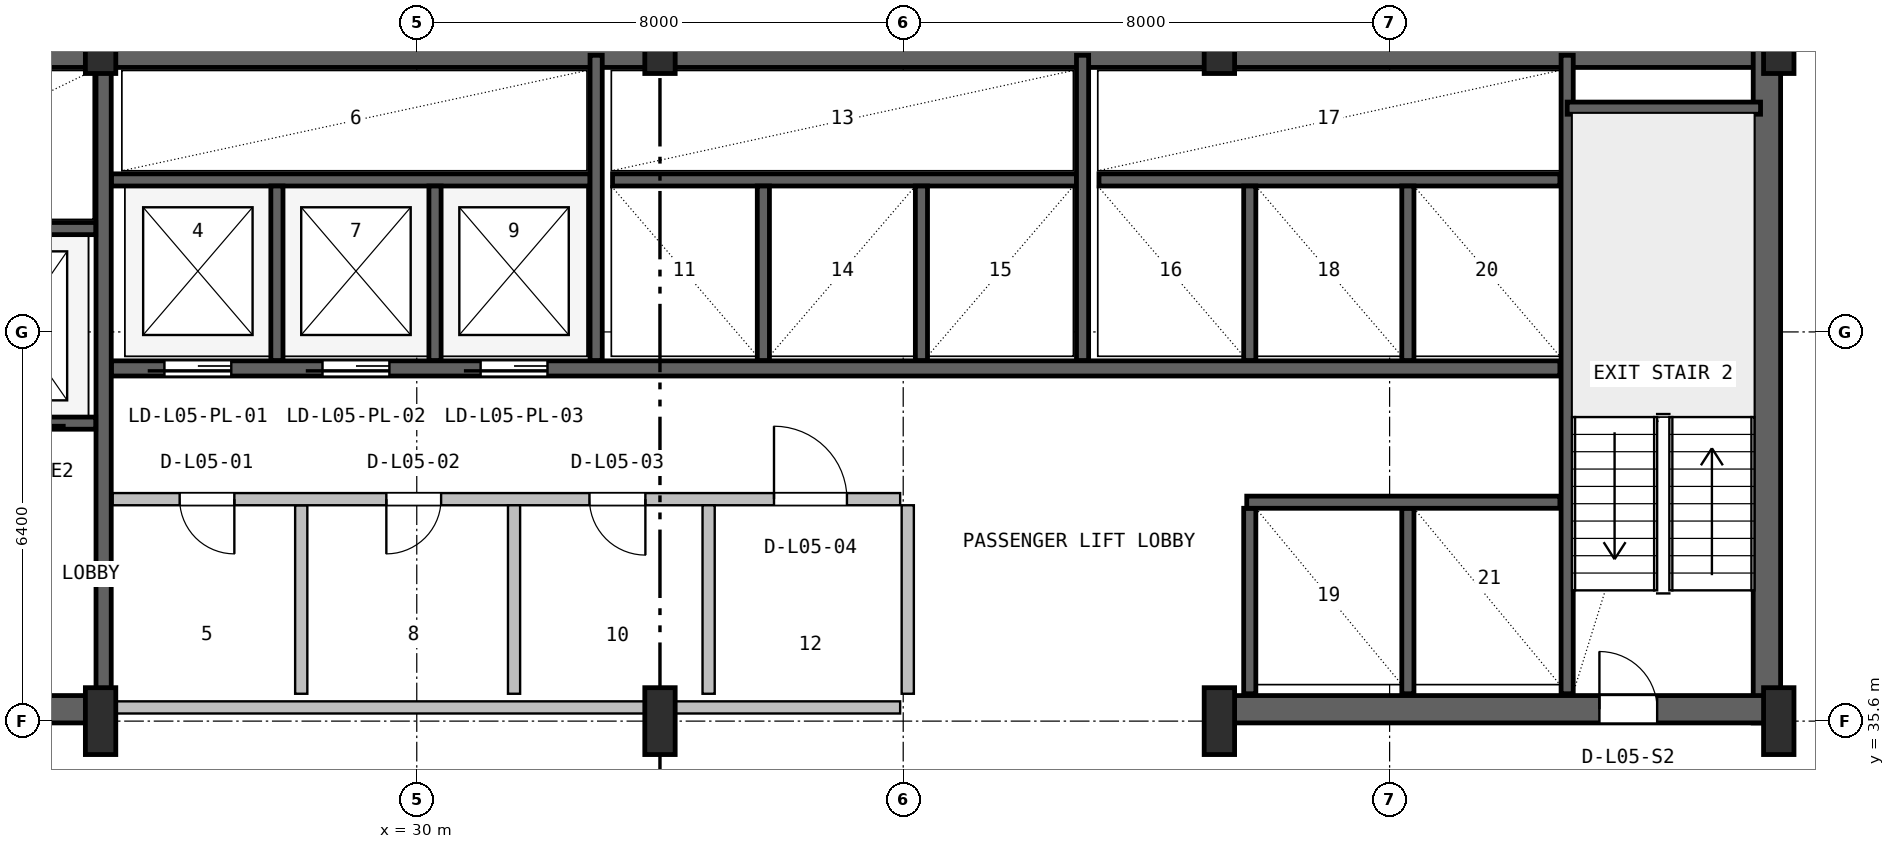
"""IFC4 building model, lengths in metres.
Left out: names, types, materials, properties, quantities, classifications, styles, units other than length and angle.
Written with IfcOpenShell. Run it as: python <this file> out.ifc"""

import sys

from ifc_helpers import new_model, si_unit, direction, frame, frame_2d, origin, origin_2d, place, context, subcontext, project, spatial, rectangle, i_section, extrude, source, transform, mapped, element, fill, save


model = new_model("IFC4")
c1 = context("Model", 3, precision=1e-05, world=origin(), true_north=direction((0.0, 1.0)))
c2 = subcontext(c1, "Body", "Model", "MODEL_VIEW")
j1 = project(units=[si_unit("LENGTHUNIT", "METRE"), si_unit("PLANEANGLEUNIT", "RADIAN")], contexts=[c1])
p1 = place(None, origin())
s1 = spatial("IfcSite", under=j1, at=p1, CompositionType="ELEMENT")
p2 = place(p1, origin())
s2 = spatial("IfcBuilding", under=s1, at=p2, CompositionType="ELEMENT")
p3 = place(p2, frame((0.0, 0.0, 27.6)))
s3 = spatial("IfcBuildingStorey", under=s2, at=p3, CompositionType="ELEMENT", Elevation=27.6)
p4 = place(p3, frame((15.6, 46.575, 0.0), z_axis=(0.0, 0.0, 1.0), x_axis=(1.0, 0.0, 0.0)))
e1 = element("IfcWall", 1, at=p4, inside=s3, PredefinedType="SHEAR", context=c2, shape_type="SweptSolid", body=[
    extrude(rectangle(XDim=36.8, YDim=0.45, at=frame_2d((18.4, 0.0))), origin(), (0.0, 0.0, 1.0), 3.65),
])
p5 = place(p3, frame((52.205, 35.57, 0.0), z_axis=(0.0, 0.0, 1.0), x_axis=(0.0, 1.0, 0.0)))
e2 = element("IfcWall", 2, at=p5, inside=s3, PredefinedType="SHEAR", context=c2, shape_type="SweptSolid", body=[
    extrude(rectangle(XDim=11.23, YDim=0.45, at=frame_2d((5.615, 0.0))), origin(), (0.0, 0.0, 1.0), 3.65),
])
p6 = place(p3, frame((15.57, 35.795, 0.0), z_axis=(0.0, 0.0, 1.0), x_axis=(1.0, 0.0, 0.0)))
e3 = element("IfcWall", 3, at=p6, inside=s3, PredefinedType="SHEAR", context=c2, shape_type="SweptSolid", body=[
    extrude(rectangle(XDim=9.23, YDim=0.45, at=frame_2d((4.615, 0.0))), origin(), (0.0, 0.0, 1.0), 3.65),
])
p7 = place(p6, frame((5.4, 0.0, 0.0)))
e4 = element("IfcOpeningElement", 4, at=p7, cuts=e3, PredefinedType="OPENING", context=c2, shape_type="SweptSolid", body=[
    extrude(rectangle(XDim=1.0, YDim=2.1, at=frame_2d((0.5, 1.05))), frame((0.0, 0.235, 0.0), z_axis=(0.0, -1.0, 0.0), x_axis=(1.0, 0.0, 0.0)), (0.0, 0.0, 1.0), 0.47),
])
p8 = place(p3, frame((43.2, 35.795, 0.0), z_axis=(0.0, 0.0, 1.0), x_axis=(1.0, 0.0, 0.0)))
e5 = element("IfcWall", 5, at=p8, inside=s3, PredefinedType="SHEAR", context=c2, shape_type="SweptSolid", body=[
    extrude(rectangle(XDim=9.23, YDim=0.45, at=frame_2d((4.615, 0.0))), origin(), (0.0, 0.0, 1.0), 3.65),
])
p9 = place(p8, frame((6.25, 0.0, 0.0)))
e6 = element("IfcOpeningElement", 6, at=p9, cuts=e5, PredefinedType="OPENING", context=c2, shape_type="SweptSolid", body=[
    extrude(rectangle(XDim=0.95, YDim=2.1, at=frame_2d((0.475, 1.05))), frame((0.0, 0.235, 0.0), z_axis=(0.0, -1.0, 0.0), x_axis=(1.0, 0.0, 0.0)), (0.0, 0.0, 1.0), 0.47),
])
m1 = source(origin(), c2, "Body", "SweptSolid", [
    extrude(i_section(OverallWidth=0.5, OverallDepth=1.1, WebThickness=0.018, FlangeThickness=0.032, FilletRadius=0.018, at=origin_2d()), origin(), (0.0, 0.0, 1.0), 3.9),
])
for number, where, z_axis, x_axis in (
    (7, (24.8, 35.6, 0.0), (0.0, 0.0, 1.0), (1.0, 0.0, 0.0)),
    (8, (24.8, 46.8, 0.0), (0.0, 0.0, 1.0), (1.0, 0.0, 0.0)),
    (9, (34.0, 35.6, 0.0), (0.0, 0.0, 1.0), (1.0, 0.0, 0.0)),
    (10, (34.0, 46.8, 0.0), (0.0, 0.0, 1.0), (1.0, 0.0, 0.0)),
    (11, (43.2, 35.6, 0.0), (0.0, 0.0, 1.0), (1.0, 0.0, 0.0)),
    (12, (43.2, 46.8, 0.0), (0.0, 0.0, 1.0), (1.0, 0.0, 0.0)),
    (13, (52.4, 35.6, 0.0), (0.0, 0.0, 1.0), (1.0, 0.0, 0.0)),
    (14, (52.4, 46.8, 0.0), (0.0, 0.0, 1.0), (1.0, 0.0, 0.0)),
):
    element("IfcColumn", number, at=place(p3, frame(where, z_axis=z_axis, x_axis=x_axis)), inside=s3, PredefinedType="COLUMN", context=c2, shape_type="MappedRepresentation", body=[
        mapped(m1, transform((0.0, 0.0, 0.0), x_axis=(1.0, 0.0, 0.0), y_axis=(0.0, 1.0, 0.0), z_axis=(0.0, 0.0, 1.0), scale=1.0)),
    ])
p10 = place(p3, frame((24.85, 36.05, 0.0), z_axis=(0.0, 0.0, 1.0), x_axis=(0.0, 1.0, 0.0)))
e15 = element("IfcWall", 15, at=p10, inside=s3, PredefinedType="SHEAR", context=c2, shape_type="SweptSolid", body=[
    extrude(rectangle(XDim=10.45, YDim=0.25, at=frame_2d((5.225, 0.0))), origin(), (0.0, 0.0, 1.0), 3.65),
])
p11 = place(p3, frame((19.2, 40.5, 0.0), z_axis=(0.0, 0.0, 1.0), x_axis=(1.0, 0.0, 0.0)))
e16 = element("IfcWall", 16, at=p11, inside=s3, PredefinedType="SHEAR", context=c2, shape_type="SweptSolid", body=[
    extrude(rectangle(XDim=5.52, YDim=0.2, at=frame_2d((2.76, 0.0))), origin(), (0.0, 0.0, 1.0), 3.65),
])
p12 = place(p11, frame((1.05, 0.0, 0.0)))
e17 = element("IfcOpeningElement", 17, at=p12, cuts=e16, PredefinedType="OPENING", context=c2, shape_type="SweptSolid", body=[
    extrude(rectangle(XDim=1.1, YDim=2.18, at=frame_2d((0.55, 1.09))), frame((0.0, 0.11, 0.0), z_axis=(0.0, -1.0, 0.0), x_axis=(1.0, 0.0, 0.0)), (0.0, 0.0, 1.0), 0.22),
])
p13 = place(p11, frame((3.65, 0.0, 0.0)))
e18 = element("IfcOpeningElement", 18, at=p13, cuts=e16, PredefinedType="OPENING", context=c2, shape_type="SweptSolid", body=[
    extrude(rectangle(XDim=1.1, YDim=2.18, at=frame_2d((0.55, 1.09))), frame((0.0, 0.11, 0.0), z_axis=(0.0, -1.0, 0.0), x_axis=(1.0, 0.0, 0.0)), (0.0, 0.0, 1.0), 0.22),
])
p14 = place(p3, frame((19.2, 43.7, 0.0), z_axis=(0.0, 0.0, 1.0), x_axis=(1.0, 0.0, 0.0)))
e19 = element("IfcWall", 19, at=p14, inside=s3, PredefinedType="SHEAR", context=c2, shape_type="SweptSolid", body=[
    extrude(rectangle(XDim=5.52, YDim=0.2, at=frame_2d((2.76, 0.0))), origin(), (0.0, 0.0, 1.0), 3.65),
])
p15 = place(p3, frame((48.92, 36.05, 0.0), z_axis=(0.0, 0.0, 1.0), x_axis=(0.0, 1.0, 0.0)))
e20 = element("IfcWall", 20, at=p15, inside=s3, PredefinedType="SHEAR", context=c2, shape_type="SweptSolid", body=[
    extrude(rectangle(XDim=10.5, YDim=0.2, at=frame_2d((5.25, 0.0))), origin(), (0.0, 0.0, 1.0), 3.65),
])
p16 = place(p3, frame((48.92, 45.68, 0.0), z_axis=(0.0, 0.0, 1.0), x_axis=(1.0, 0.0, 0.0)))
e21 = element("IfcWall", 21, at=p16, inside=s3, PredefinedType="SHEAR", context=c2, shape_type="SweptSolid", body=[
    extrude(rectangle(XDim=3.18, YDim=0.2, at=frame_2d((1.59, 0.0))), origin(), (0.0, 0.0, 1.0), 3.65),
])
p17 = place(p3, frame((24.98, 41.4, 0.0), z_axis=(0.0, 0.0, 1.0), x_axis=(1.0, 0.0, 0.0)))
e22 = element("IfcWall", 22, at=p17, inside=s3, PredefinedType="SHEAR", context=c2, shape_type="SweptSolid", body=[
    extrude(rectangle(XDim=23.82, YDim=0.25, at=frame_2d((11.91, 0.0))), origin(), (0.0, 0.0, 1.0), 3.65),
])
p18 = place(p17, frame((0.87, 0.0, 0.0)))
e23 = element("IfcOpeningElement", 23, at=p18, cuts=e22, PredefinedType="OPENING", context=c2, shape_type="SweptSolid", body=[
    extrude(rectangle(XDim=1.1, YDim=2.18, at=frame_2d((0.55, 1.09))), frame((0.0, 0.135, 0.0), z_axis=(0.0, -1.0, 0.0), x_axis=(1.0, 0.0, 0.0)), (0.0, 0.0, 1.0), 0.27),
])
p19 = place(p17, frame((3.47, 0.0, 0.0)))
e24 = element("IfcOpeningElement", 24, at=p19, cuts=e22, PredefinedType="OPENING", context=c2, shape_type="SweptSolid", body=[
    extrude(rectangle(XDim=1.1, YDim=2.18, at=frame_2d((0.55, 1.09))), frame((0.0, 0.135, 0.0), z_axis=(0.0, -1.0, 0.0), x_axis=(1.0, 0.0, 0.0)), (0.0, 0.0, 1.0), 0.27),
])
p20 = place(p17, frame((6.07, 0.0, 0.0)))
e25 = element("IfcOpeningElement", 25, at=p20, cuts=e22, PredefinedType="OPENING", context=c2, shape_type="SweptSolid", body=[
    extrude(rectangle(XDim=1.1, YDim=2.18, at=frame_2d((0.55, 1.09))), frame((0.0, 0.135, 0.0), z_axis=(0.0, -1.0, 0.0), x_axis=(1.0, 0.0, 0.0)), (0.0, 0.0, 1.0), 0.27),
])
p21 = place(p3, frame((24.98, 44.5, 0.0), z_axis=(0.0, 0.0, 1.0), x_axis=(1.0, 0.0, 0.0)))
e26 = element("IfcWall", 26, at=p21, inside=s3, PredefinedType="SHEAR", context=c2, shape_type="SweptSolid", body=[
    extrude(rectangle(XDim=7.87, YDim=0.2, at=frame_2d((3.935, 0.0))), origin(), (0.0, 0.0, 1.0), 3.65),
])
for number, where, z_axis, x_axis in (
    (27, (27.7, 41.53, 0.0), (0.0, 0.0, 1.0), (0.0, 1.0, 0.0)),
    (28, (30.3, 41.53, 0.0), (0.0, 0.0, 1.0), (0.0, 1.0, 0.0)),
):
    element("IfcWall", number, at=place(p3, frame(where, z_axis=z_axis, x_axis=x_axis)), inside=s3, PredefinedType="SHEAR", context=c2, shape_type="SweptSolid", body=[
        extrude(rectangle(XDim=2.87, YDim=0.2, at=frame_2d((1.435, 0.0))), origin(), (0.0, 0.0, 1.0), 3.65),
    ])
p22 = place(p3, frame((32.95, 41.53, 0.0), z_axis=(0.0, 0.0, 1.0), x_axis=(0.0, 1.0, 0.0)))
e29 = element("IfcWall", 29, at=p22, inside=s3, PredefinedType="SHEAR", context=c2, shape_type="SweptSolid", body=[
    extrude(rectangle(XDim=5.02, YDim=0.2, at=frame_2d((2.51, 0.0))), origin(), (0.0, 0.0, 1.0), 3.65),
])
p23 = place(p3, frame((33.22, 44.5, 0.0), z_axis=(0.0, 0.0, 1.0), x_axis=(1.0, 0.0, 0.0)))
e30 = element("IfcWall", 30, at=p23, inside=s3, PredefinedType="SHEAR", context=c2, shape_type="SweptSolid", body=[
    extrude(rectangle(XDim=7.63, YDim=0.2, at=frame_2d((3.815, 0.0))), origin(), (0.0, 0.0, 1.0), 3.65),
])
for number, where, z_axis, x_axis in (
    (31, (35.7, 41.53, 0.0), (0.0, 0.0, 1.0), (0.0, 1.0, 0.0)),
    (32, (38.3, 41.53, 0.0), (0.0, 0.0, 1.0), (0.0, 1.0, 0.0)),
):
    element("IfcWall", number, at=place(p3, frame(where, z_axis=z_axis, x_axis=x_axis)), inside=s3, PredefinedType="SHEAR", context=c2, shape_type="SweptSolid", body=[
        extrude(rectangle(XDim=2.87, YDim=0.2, at=frame_2d((1.435, 0.0))), origin(), (0.0, 0.0, 1.0), 3.65),
    ])
p24 = place(p3, frame((40.95, 41.53, 0.0), z_axis=(0.0, 0.0, 1.0), x_axis=(0.0, 1.0, 0.0)))
e33 = element("IfcWall", 33, at=p24, inside=s3, PredefinedType="SHEAR", context=c2, shape_type="SweptSolid", body=[
    extrude(rectangle(XDim=5.02, YDim=0.2, at=frame_2d((2.51, 0.0))), origin(), (0.0, 0.0, 1.0), 3.65),
])
p25 = place(p3, frame((41.22, 44.5, 0.0), z_axis=(0.0, 0.0, 1.0), x_axis=(1.0, 0.0, 0.0)))
e34 = element("IfcWall", 34, at=p25, inside=s3, PredefinedType="SHEAR", context=c2, shape_type="SweptSolid", body=[
    extrude(rectangle(XDim=7.58, YDim=0.2, at=frame_2d((3.79, 0.0))), origin(), (0.0, 0.0, 1.0), 3.65),
])
for number, where, z_axis, x_axis in (
    (35, (43.7, 41.53, 0.0), (0.0, 0.0, 1.0), (0.0, 1.0, 0.0)),
    (36, (46.3, 41.53, 0.0), (0.0, 0.0, 1.0), (0.0, 1.0, 0.0)),
):
    element("IfcWall", number, at=place(p3, frame(where, z_axis=z_axis, x_axis=x_axis)), inside=s3, PredefinedType="SHEAR", context=c2, shape_type="SweptSolid", body=[
        extrude(rectangle(XDim=2.87, YDim=0.2, at=frame_2d((1.435, 0.0))), origin(), (0.0, 0.0, 1.0), 3.65),
    ])
for number, where, z_axis, x_axis in (
    (37, (43.7, 36.05, 0.0), (0.0, 0.0, 1.0), (0.0, 1.0, 0.0)),
    (38, (46.3, 36.05, 0.0), (0.0, 0.0, 1.0), (0.0, 1.0, 0.0)),
):
    element("IfcWall", number, at=place(p3, frame(where, z_axis=z_axis, x_axis=x_axis)), inside=s3, PredefinedType="SHEAR", context=c2, shape_type="SweptSolid", body=[
        extrude(rectangle(XDim=3.05, YDim=0.2, at=frame_2d((1.525, 0.0))), origin(), (0.0, 0.0, 1.0), 3.65),
    ])
p26 = place(p3, frame((43.65, 39.2, 0.0), z_axis=(0.0, 0.0, 1.0), x_axis=(1.0, 0.0, 0.0)))
e39 = element("IfcWall", 39, at=p26, inside=s3, PredefinedType="SHEAR", context=c2, shape_type="SweptSolid", body=[
    extrude(rectangle(XDim=5.15, YDim=0.2, at=frame_2d((2.575, 0.0))), origin(), (0.0, 0.0, 1.0), 3.65),
])
p27 = place(p3, frame((25.0, 35.825, 0.0), z_axis=(0.0, 0.0, 1.0), x_axis=(1.0, 0.0, 0.0)))
e40 = element("IfcWall", 40, at=p27, inside=s3, PredefinedType="SOLIDWALL", context=c2, shape_type="SweptSolid", body=[
    extrude(rectangle(XDim=12.95, YDim=0.2, at=frame_2d((6.475, 0.0))), origin(), (0.0, 0.0, 1.0), 2.425),
])
p28 = place(p3, frame((28.1, 36.05, 0.0), z_axis=(0.0, 0.0, 1.0), x_axis=(0.0, 1.0, 0.0)))
e41 = element("IfcWall", 41, at=p28, inside=s3, PredefinedType="PLUMBINGWALL", context=c2, shape_type="SweptSolid", body=[
    extrude(rectangle(XDim=3.1, YDim=0.2, at=frame_2d((1.55, 0.0))), origin(), (0.0, 0.0, 1.0), 3.63),
])
p29 = place(p3, frame((25.0, 39.25, 0.0), z_axis=(0.0, 0.0, 1.0), x_axis=(1.0, 0.0, 0.0)))
e42 = element("IfcWall", 42, at=p29, inside=s3, PredefinedType="SOLIDWALL", context=c2, shape_type="SweptSolid", body=[
    extrude(rectangle(XDim=12.95, YDim=0.2, at=frame_2d((6.475, 0.0))), origin(), (0.0, 0.0, 1.0), 3.63),
])
p30 = place(p29, frame((1.1, 0.0, 0.0)))
e43 = element("IfcOpeningElement", 43, at=p30, cuts=e42, PredefinedType="OPENING", context=c2, shape_type="SweptSolid", body=[
    extrude(rectangle(XDim=0.9, YDim=2.06, at=frame_2d((0.45, 1.03))), frame((0.0, 0.11, 0.0), z_axis=(0.0, -1.0, 0.0), x_axis=(1.0, 0.0, 0.0)), (0.0, 0.0, 1.0), 0.22),
])
p31 = place(p29, frame((4.5, 0.0, 0.0)))
e44 = element("IfcOpeningElement", 44, at=p31, cuts=e42, PredefinedType="OPENING", context=c2, shape_type="SweptSolid", body=[
    extrude(rectangle(XDim=0.9, YDim=2.06, at=frame_2d((0.45, 1.03))), frame((0.0, 0.11, 0.0), z_axis=(0.0, -1.0, 0.0), x_axis=(1.0, 0.0, 0.0)), (0.0, 0.0, 1.0), 0.22),
])
p32 = place(p29, frame((7.84, 0.0, 0.0)))
e45 = element("IfcOpeningElement", 45, at=p32, cuts=e42, PredefinedType="OPENING", context=c2, shape_type="SweptSolid", body=[
    extrude(rectangle(XDim=0.92, YDim=2.08, at=frame_2d((0.46, 1.04))), frame((0.0, 0.11, 0.0), z_axis=(0.0, -1.0, 0.0), x_axis=(1.0, 0.0, 0.0)), (0.0, 0.0, 1.0), 0.22),
])
p33 = place(p29, frame((10.875, 0.0, 0.0)))
e46 = element("IfcOpeningElement", 46, at=p33, cuts=e42, PredefinedType="OPENING", context=c2, shape_type="SweptSolid", body=[
    extrude(rectangle(XDim=1.2, YDim=2.1, at=frame_2d((0.6, 1.05))), frame((0.0, 0.11, 0.0), z_axis=(0.0, -1.0, 0.0), x_axis=(1.0, 0.0, 0.0)), (0.0, 0.0, 1.0), 0.22),
])
p34 = place(p3, frame((31.6, 36.05, 0.0), z_axis=(0.0, 0.0, 1.0), x_axis=(0.0, 1.0, 0.0)))
e47 = element("IfcWall", 47, at=p34, inside=s3, PredefinedType="PLUMBINGWALL", context=c2, shape_type="SweptSolid", body=[
    extrude(rectangle(XDim=3.1, YDim=0.2, at=frame_2d((1.55, 0.0))), origin(), (0.0, 0.0, 1.0), 3.63),
])
for number, where, z_axis, x_axis in (
    (48, (34.8, 36.05, 0.0), (0.0, 0.0, 1.0), (0.0, 1.0, 0.0)),
    (49, (38.075, 36.05, 0.0), (0.0, 0.0, 1.0), (0.0, 1.0, 0.0)),
):
    element("IfcWall", number, at=place(p3, frame(where, z_axis=z_axis, x_axis=x_axis)), inside=s3, PredefinedType="SOLIDWALL", context=c2, shape_type="SweptSolid", body=[
        extrude(rectangle(XDim=3.1, YDim=0.2, at=frame_2d((1.55, 0.0))), origin(), (0.0, 0.0, 1.0), 3.63),
    ])
m2 = source(origin(), c2, "Body", "SweptSolid", [
    extrude(rectangle(XDim=0.95, YDim=2.1, at=frame_2d((0.475, 1.05))), frame((0.0, 0.025, 0.0), z_axis=(0.0, -1.0, 0.0), x_axis=(1.0, 0.0, 0.0)), (0.0, 0.0, 1.0), 0.05),
])
p35 = place(p9, origin())
e50 = element("IfcDoor", 50, at=p35, inside=s3, OperationType="SINGLE_SWING_LEFT", PredefinedType="DOOR", context=c2, shape_type="MappedRepresentation", body=[
    mapped(m2, transform((0.0, 0.0, 0.0), x_axis=(1.0, 0.0, 0.0), y_axis=(0.0, 1.0, 0.0), z_axis=(0.0, 0.0, 1.0), scale=1.0)),
])
fill(e6, e50)
m3 = source(origin(), c2, "Body", "SweptSolid", [
    extrude(rectangle(XDim=1.1, YDim=2.18, at=frame_2d((0.55, 1.09))), frame((0.0, 0.025, 0.0), z_axis=(0.0, -1.0, 0.0), x_axis=(1.0, 0.0, 0.0)), (0.0, 0.0, 1.0), 0.05),
])
p36 = place(p18, frame((1.1, 0.0, 0.0), z_axis=(0.0, 0.0, 1.0), x_axis=(-1.0, 0.0, 0.0)))
e51 = element("IfcDoor", 51, at=p36, inside=s3, OperationType="SLIDING_TO_LEFT", PredefinedType="DOOR", context=c2, shape_type="MappedRepresentation", body=[
    mapped(m3, transform((0.0, 0.0, 0.0), x_axis=(1.0, 0.0, 0.0), y_axis=(0.0, 1.0, 0.0), z_axis=(0.0, 0.0, 1.0), scale=1.0)),
])
fill(e23, e51)
p37 = place(p19, frame((1.1, 0.0, 0.0), z_axis=(0.0, 0.0, 1.0), x_axis=(-1.0, 0.0, 0.0)))
e52 = element("IfcDoor", 52, at=p37, inside=s3, OperationType="SLIDING_TO_LEFT", PredefinedType="DOOR", context=c2, shape_type="MappedRepresentation", body=[
    mapped(m3, transform((0.0, 0.0, 0.0), x_axis=(1.0, 0.0, 0.0), y_axis=(0.0, 1.0, 0.0), z_axis=(0.0, 0.0, 1.0), scale=1.0)),
])
fill(e24, e52)
p38 = place(p20, frame((1.1, 0.0, 0.0), z_axis=(0.0, 0.0, 1.0), x_axis=(-1.0, 0.0, 0.0)))
e53 = element("IfcDoor", 53, at=p38, inside=s3, OperationType="SLIDING_TO_LEFT", PredefinedType="DOOR", context=c2, shape_type="MappedRepresentation", body=[
    mapped(m3, transform((0.0, 0.0, 0.0), x_axis=(1.0, 0.0, 0.0), y_axis=(0.0, 1.0, 0.0), z_axis=(0.0, 0.0, 1.0), scale=1.0)),
])
fill(e25, e53)
m4 = source(origin(), c2, "Body", "SweptSolid", [
    extrude(rectangle(XDim=0.9, YDim=2.06, at=frame_2d((0.45, 1.03))), frame((0.0, 0.025, 0.0), z_axis=(0.0, -1.0, 0.0), x_axis=(1.0, 0.0, 0.0)), (0.0, 0.0, 1.0), 0.05),
])
p39 = place(p30, frame((0.9, 0.0, 0.0), z_axis=(0.0, 0.0, 1.0), x_axis=(-1.0, 0.0, 0.0)))
e54 = element("IfcDoor", 54, at=p39, inside=s3, OperationType="SINGLE_SWING_RIGHT", PredefinedType="DOOR", context=c2, shape_type="MappedRepresentation", body=[
    mapped(m4, transform((0.0, 0.0, 0.0), x_axis=(1.0, 0.0, 0.0), y_axis=(0.0, 1.0, 0.0), z_axis=(0.0, 0.0, 1.0), scale=1.0)),
])
fill(e43, e54)
p40 = place(p31, frame((0.9, 0.0, 0.0), z_axis=(0.0, 0.0, 1.0), x_axis=(-1.0, 0.0, 0.0)))
e55 = element("IfcDoor", 55, at=p40, inside=s3, OperationType="SINGLE_SWING_LEFT", PredefinedType="DOOR", context=c2, shape_type="MappedRepresentation", body=[
    mapped(m4, transform((0.0, 0.0, 0.0), x_axis=(1.0, 0.0, 0.0), y_axis=(0.0, 1.0, 0.0), z_axis=(0.0, 0.0, 1.0), scale=1.0)),
])
fill(e44, e55)
m5 = source(origin(), c2, "Body", "SweptSolid", [
    extrude(rectangle(XDim=0.92, YDim=2.08, at=frame_2d((0.46, 1.04))), frame((0.0, 0.025, 0.0), z_axis=(0.0, -1.0, 0.0), x_axis=(1.0, 0.0, 0.0)), (0.0, 0.0, 1.0), 0.05),
])
p41 = place(p32, frame((0.92, 0.0, 0.0), z_axis=(0.0, 0.0, 1.0), x_axis=(-1.0, 0.0, 0.0)))
e56 = element("IfcDoor", 56, at=p41, inside=s3, OperationType="SINGLE_SWING_RIGHT", PredefinedType="DOOR", context=c2, shape_type="MappedRepresentation", body=[
    mapped(m5, transform((0.0, 0.0, 0.0), x_axis=(1.0, 0.0, 0.0), y_axis=(0.0, 1.0, 0.0), z_axis=(0.0, 0.0, 1.0), scale=1.0)),
])
fill(e45, e56)
m6 = source(origin(), c2, "Body", "SweptSolid", [
    extrude(rectangle(XDim=1.2, YDim=2.1, at=frame_2d((0.6, 1.05))), frame((0.0, 0.025, 0.0), z_axis=(0.0, -1.0, 0.0), x_axis=(1.0, 0.0, 0.0)), (0.0, 0.0, 1.0), 0.05),
])
p42 = place(p33, origin())
e57 = element("IfcDoor", 57, at=p42, inside=s3, OperationType="SINGLE_SWING_LEFT", PredefinedType="DOOR", context=c2, shape_type="MappedRepresentation", body=[
    mapped(m6, transform((0.0, 0.0, 0.0), x_axis=(1.0, 0.0, 0.0), y_axis=(0.0, 1.0, 0.0), z_axis=(0.0, 0.0, 1.0), scale=1.0)),
])
fill(e46, e57)
save(model, sys.argv[1])
